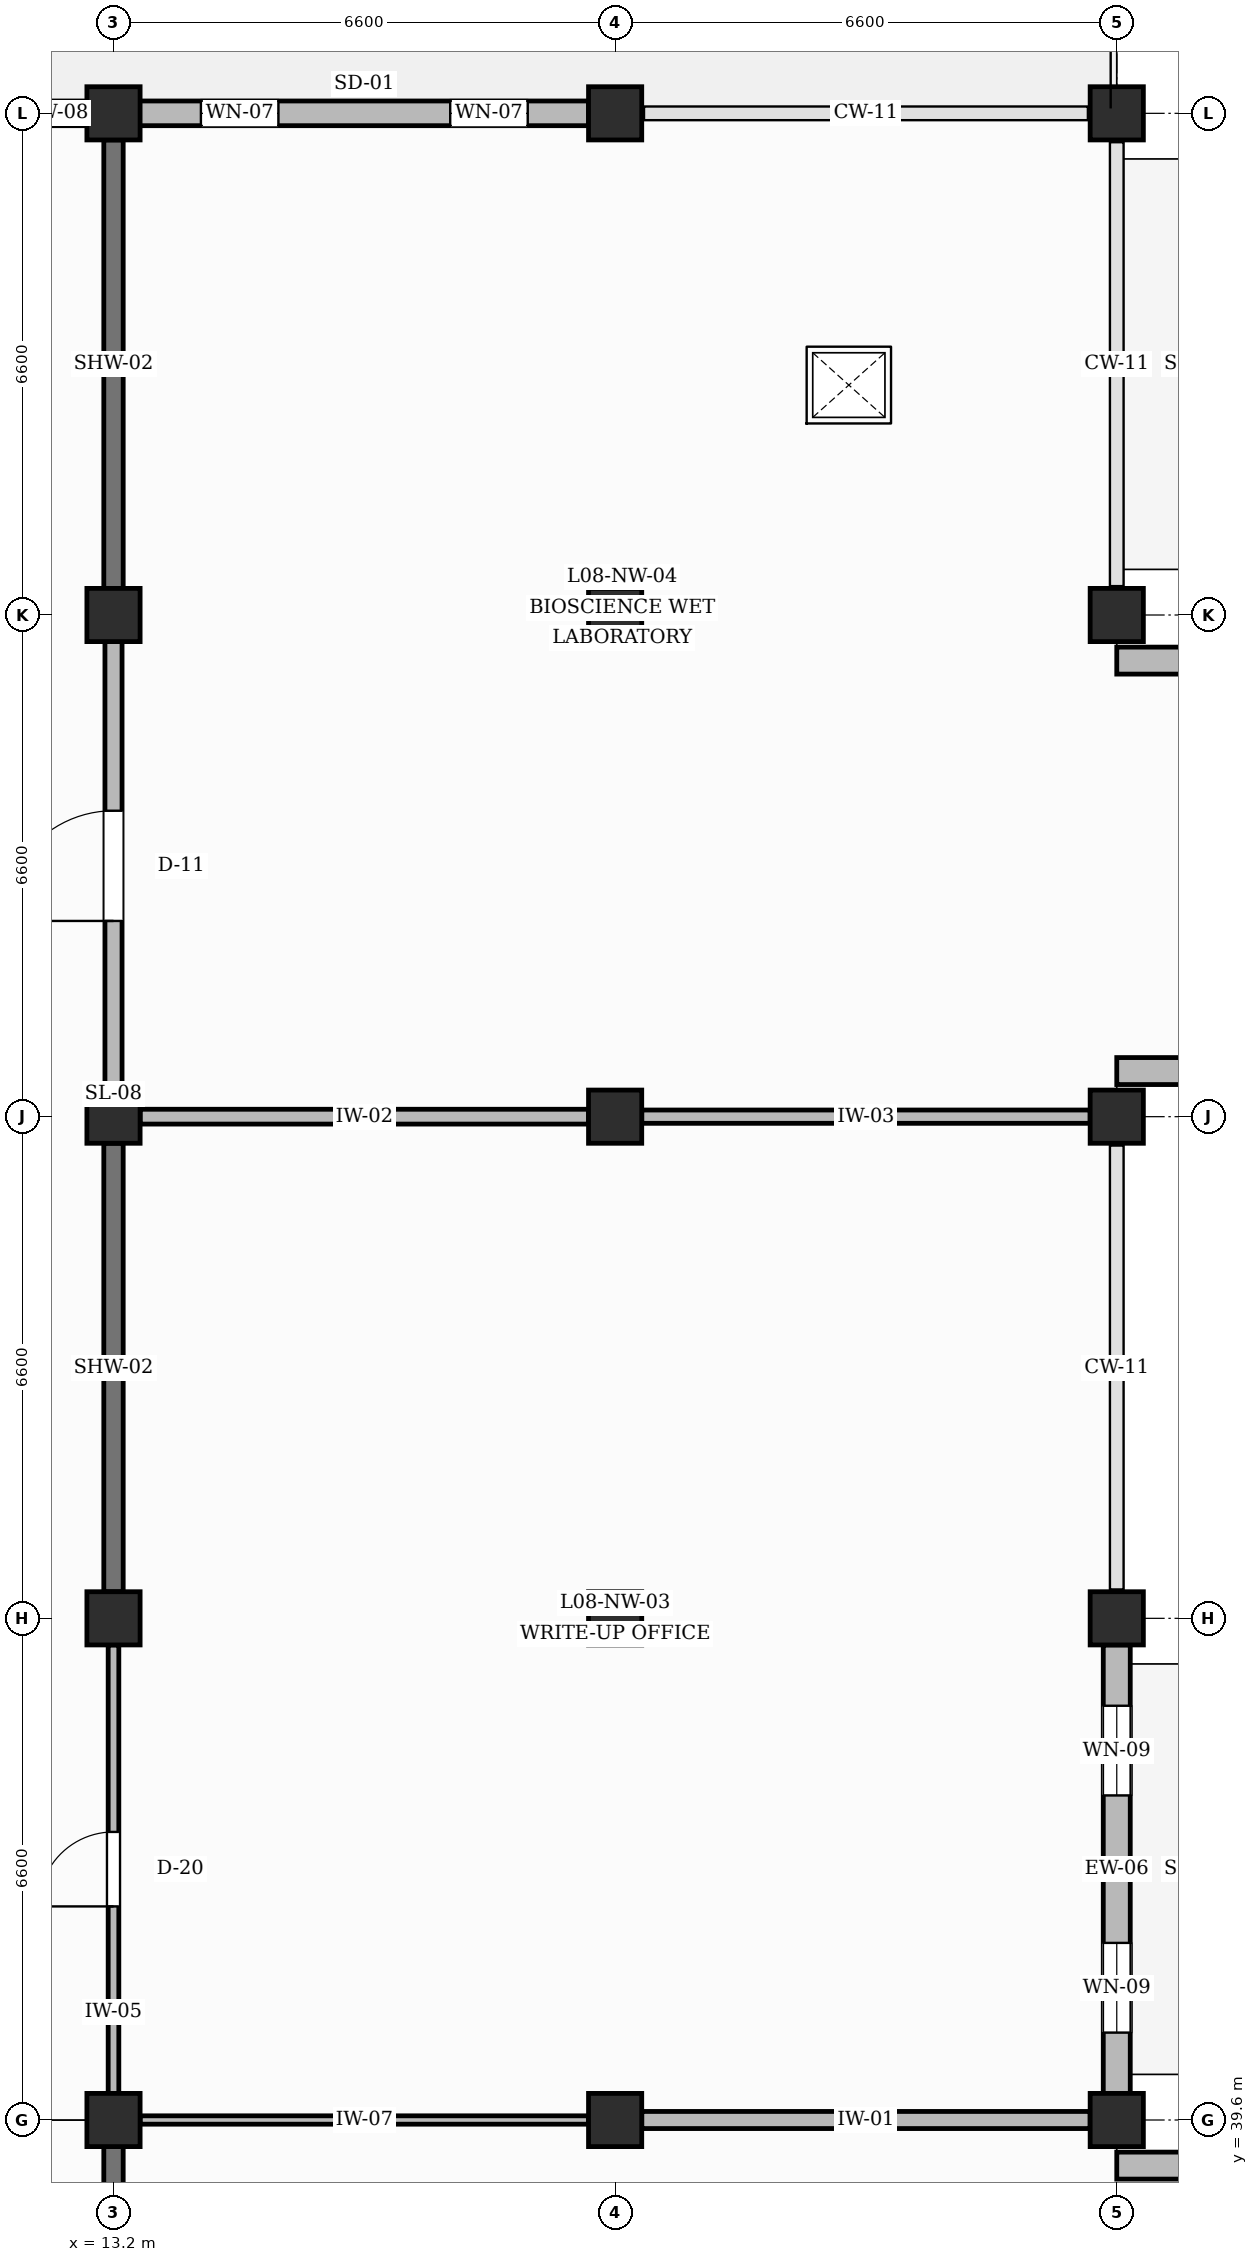
"""IFC4 building model, lengths in metres.
Left out: names, types, materials, properties, quantities, classifications, styles, units other than length and angle.
Written with IfcOpenShell. Run it as: python <this file> out.ifc"""

import sys

from ifc_helpers import new_model, si_unit, direction, frame, frame_2d, origin, origin_2d, place, context, subcontext, project, spatial, rectangle, extrude, element, fill, save


model = new_model("IFC4")
c1 = context("Model", 3, precision=1e-05, world=origin(), true_north=direction((0.0, 1.0)))
c2 = subcontext(c1, "Body", "Model", "MODEL_VIEW")
j1 = project(units=[si_unit("LENGTHUNIT", "METRE"), si_unit("PLANEANGLEUNIT", "RADIAN")], contexts=[c1])
p1 = place(None, origin())
s1 = spatial("IfcSite", under=j1, at=p1, CompositionType="ELEMENT")
p2 = place(p1, origin())
s2 = spatial("IfcBuilding", under=s1, at=p2, CompositionType="ELEMENT")
p3 = place(p2, frame((0.0, 0.0, 35.4)))
s3 = spatial("IfcBuildingStorey", under=s2, at=p3, CompositionType="ELEMENT", Elevation=35.4)
for number, where, z_axis, x_axis in (
    (1, (13.2, 39.6, 0.0), (0.0, 0.0, 1.0), (1.0, 0.0, 0.0)),
    (2, (13.2, 46.2, 0.0), (0.0, 0.0, 1.0), (1.0, 0.0, 0.0)),
    (3, (13.2, 52.8, 0.0), (0.0, 0.0, 1.0), (1.0, 0.0, 0.0)),
    (4, (13.2, 59.4, 0.0), (0.0, 0.0, 1.0), (1.0, 0.0, 0.0)),
    (5, (13.2, 66.0, 0.0), (0.0, 0.0, 1.0), (1.0, 0.0, 0.0)),
    (6, (19.8, 39.6, 0.0), (0.0, 0.0, 1.0), (1.0, 0.0, 0.0)),
    (7, (19.8, 46.2, 0.0), (0.0, 0.0, 1.0), (1.0, 0.0, 0.0)),
    (8, (19.8, 52.8, 0.0), (0.0, 0.0, 1.0), (1.0, 0.0, 0.0)),
    (9, (19.8, 59.4, 0.0), (0.0, 0.0, 1.0), (1.0, 0.0, 0.0)),
    (10, (19.8, 66.0, 0.0), (0.0, 0.0, 1.0), (1.0, 0.0, 0.0)),
    (11, (26.4, 39.6, 0.0), (0.0, 0.0, 1.0), (1.0, 0.0, 0.0)),
    (12, (26.4, 46.2, 0.0), (0.0, 0.0, 1.0), (1.0, 0.0, 0.0)),
    (13, (26.4, 52.8, 0.0), (0.0, 0.0, 1.0), (1.0, 0.0, 0.0)),
    (14, (26.4, 59.4, 0.0), (0.0, 0.0, 1.0), (1.0, 0.0, 0.0)),
    (15, (26.4, 66.0, 0.0), (0.0, 0.0, 1.0), (1.0, 0.0, 0.0)),
):
    element("IfcColumn", number, at=place(p3, frame(where, z_axis=z_axis, x_axis=x_axis)), inside=s3, PredefinedType="COLUMN", context=c2, shape_type="SweptSolid", body=[
        extrude(rectangle(XDim=0.7, YDim=0.7, at=origin_2d()), origin(), (0.0, 0.0, 1.0), 4.2),
    ])
p4 = place(p3, frame((6.95, 66.0, 0.0), z_axis=(0.0, 0.0, 1.0), x_axis=(1.0, 0.0, 0.0)))
e16 = element("IfcWall", 16, at=p4, inside=s3, PredefinedType="SOLIDWALL", context=c2, shape_type="SweptSolid", body=[
    extrude(rectangle(XDim=5.9, YDim=0.325, at=frame_2d((2.95, 0.0))), origin(), (0.0, 0.0, 1.0), 3.28),
])
p5 = place(p4, frame((2.3, 0.0, 0.0)))
e17 = element("IfcOpeningElement", 17, at=p5, cuts=e16, PredefinedType="OPENING", context=c2, shape_type="SweptSolid", body=[
    extrude(rectangle(XDim=1.3, YDim=2.2, at=frame_2d((0.65, 1.1))), frame((0.0, 0.172, 0.0), z_axis=(0.0, -1.0, 0.0), x_axis=(1.0, 0.0, 0.0)), (0.0, 0.0, 1.0), 0.345),
])
p6 = place(p3, frame((13.55, 66.0, 0.0), z_axis=(0.0, 0.0, 1.0), x_axis=(1.0, 0.0, 0.0)))
e18 = element("IfcWall", 18, at=p6, inside=s3, PredefinedType="SOLIDWALL", context=c2, shape_type="SweptSolid", body=[
    extrude(rectangle(XDim=5.9, YDim=0.325, at=frame_2d((2.95, 0.0))), origin(), (0.0, 0.0, 1.0), 3.28),
])
p7 = place(p6, frame((0.8, 0.0, 0.95)))
e19 = element("IfcOpeningElement", 19, at=p7, cuts=e18, PredefinedType="OPENING", context=c2, shape_type="SweptSolid", body=[
    extrude(rectangle(XDim=1.02, YDim=1.74, at=frame_2d((0.51, 0.87))), frame((0.0, 0.172, 0.0), z_axis=(0.0, -1.0, 0.0), x_axis=(1.0, 0.0, 0.0)), (0.0, 0.0, 1.0), 0.345),
])
p8 = place(p6, frame((4.08, 0.0, 0.95)))
e20 = element("IfcOpeningElement", 20, at=p8, cuts=e18, PredefinedType="OPENING", context=c2, shape_type="SweptSolid", body=[
    extrude(rectangle(XDim=1.02, YDim=1.74, at=frame_2d((0.51, 0.87))), frame((0.0, 0.172, 0.0), z_axis=(0.0, -1.0, 0.0), x_axis=(1.0, 0.0, 0.0)), (0.0, 0.0, 1.0), 0.345),
])
p9 = place(p3, frame((26.4, 39.0, 0.0), z_axis=(0.0, 0.0, 1.0), x_axis=(1.0, 0.0, 0.0)))
e21 = element("IfcWall", 21, at=p9, inside=s3, PredefinedType="SOLIDWALL", context=c2, shape_type="SweptSolid", body=[
    extrude(rectangle(XDim=2.0, YDim=0.355, at=frame_2d((1.0, 0.0))), origin(), (0.0, 0.0, 1.0), 3.28),
])
p10 = place(p3, frame((26.4, 39.95, 0.0), z_axis=(0.0, 0.0, 1.0), x_axis=(0.0, 1.0, 0.0)))
e22 = element("IfcWall", 22, at=p10, inside=s3, PredefinedType="SOLIDWALL", context=c2, shape_type="SweptSolid", body=[
    extrude(rectangle(XDim=5.9, YDim=0.355, at=frame_2d((2.95, 0.0))), origin(), (0.0, 0.0, 1.0), 3.28),
])
p11 = place(p10, frame((0.8, 0.0, 0.95)))
e23 = element("IfcOpeningElement", 23, at=p11, cuts=e22, PredefinedType="OPENING", context=c2, shape_type="SweptSolid", body=[
    extrude(rectangle(XDim=1.18, YDim=1.3, at=frame_2d((0.59, 0.65))), frame((0.0, 0.188, 0.0), z_axis=(0.0, -1.0, 0.0), x_axis=(1.0, 0.0, 0.0)), (0.0, 0.0, 1.0), 0.375),
])
p12 = place(p10, frame((3.92, 0.0, 0.95)))
e24 = element("IfcOpeningElement", 24, at=p12, cuts=e22, PredefinedType="OPENING", context=c2, shape_type="SweptSolid", body=[
    extrude(rectangle(XDim=1.18, YDim=1.3, at=frame_2d((0.59, 0.65))), frame((0.0, 0.188, 0.0), z_axis=(0.0, -1.0, 0.0), x_axis=(1.0, 0.0, 0.0)), (0.0, 0.0, 1.0), 0.375),
])
for number, where, z_axis, x_axis in (
    (25, (26.4, 53.4, 0.0), (0.0, 0.0, 1.0), (1.0, 0.0, 0.0)),
    (26, (26.4, 58.8, 0.0), (0.0, 0.0, 1.0), (1.0, 0.0, 0.0)),
):
    element("IfcWall", number, at=place(p3, frame(where, z_axis=z_axis, x_axis=x_axis)), inside=s3, PredefinedType="SOLIDWALL", context=c2, shape_type="SweptSolid", body=[
        extrude(rectangle(XDim=2.0, YDim=0.355, at=frame_2d((1.0, 0.0))), origin(), (0.0, 0.0, 1.0), 3.28),
    ])
p13 = place(p3, frame((13.2, 33.35, 0.0), z_axis=(0.0, 0.0, 1.0), x_axis=(0.0, 1.0, 0.0)))
e27 = element("IfcWall", 27, at=p13, inside=s3, PredefinedType="SHEAR", context=c2, shape_type="SweptSolid", body=[
    extrude(rectangle(XDim=5.9, YDim=0.255, at=frame_2d((2.95, 0.0))), origin(), (0.0, 0.0, 1.0), 3.18),
])
p14 = place(p3, frame((13.2, 39.95, 0.0), z_axis=(0.0, 0.0, 1.0), x_axis=(0.0, 1.0, 0.0)))
e28 = element("IfcWall", 28, at=p14, inside=s3, PredefinedType="PARTITIONING", context=c2, shape_type="SweptSolid", body=[
    extrude(rectangle(XDim=5.9, YDim=0.14, at=frame_2d((2.95, 0.0))), origin(), (0.0, 0.0, 1.0), 3.18),
])
p15 = place(p14, frame((2.46, 0.0, 0.0)))
e29 = element("IfcOpeningElement", 29, at=p15, cuts=e28, PredefinedType="OPENING", context=c2, shape_type="SweptSolid", body=[
    extrude(rectangle(XDim=0.98, YDim=2.15, at=frame_2d((0.49, 1.075))), frame((0.0, 0.08, 0.0), z_axis=(0.0, -1.0, 0.0), x_axis=(1.0, 0.0, 0.0)), (0.0, 0.0, 1.0), 0.16),
])
p16 = place(p3, frame((13.2, 46.55, 0.0), z_axis=(0.0, 0.0, 1.0), x_axis=(0.0, 1.0, 0.0)))
e30 = element("IfcWall", 30, at=p16, inside=s3, PredefinedType="SHEAR", context=c2, shape_type="SweptSolid", body=[
    extrude(rectangle(XDim=5.9, YDim=0.255, at=frame_2d((2.95, 0.0))), origin(), (0.0, 0.0, 1.0), 3.18),
])
p17 = place(p3, frame((13.2, 53.15, 0.0), z_axis=(0.0, 0.0, 1.0), x_axis=(0.0, 1.0, 0.0)))
e31 = element("IfcWall", 31, at=p17, inside=s3, PredefinedType="PARTITIONING", context=c2, shape_type="SweptSolid", body=[
    extrude(rectangle(XDim=5.9, YDim=0.225, at=frame_2d((2.95, 0.0))), origin(), (0.0, 0.0, 1.0), 3.18),
])
p18 = place(p17, frame((2.225, 0.0, 0.0)))
e32 = element("IfcOpeningElement", 32, at=p18, cuts=e31, PredefinedType="OPENING", context=c2, shape_type="SweptSolid", body=[
    extrude(rectangle(XDim=1.45, YDim=2.25, at=frame_2d((0.725, 1.125))), frame((0.0, 0.123, 0.0), z_axis=(0.0, -1.0, 0.0), x_axis=(1.0, 0.0, 0.0)), (0.0, 0.0, 1.0), 0.245),
])
p19 = place(p3, frame((13.2, 59.75, 0.0), z_axis=(0.0, 0.0, 1.0), x_axis=(0.0, 1.0, 0.0)))
e33 = element("IfcWall", 33, at=p19, inside=s3, PredefinedType="SHEAR", context=c2, shape_type="SweptSolid", body=[
    extrude(rectangle(XDim=5.9, YDim=0.255, at=frame_2d((2.95, 0.0))), origin(), (0.0, 0.0, 1.0), 3.18),
])
p20 = place(p3, frame((13.55, 39.6, 0.0), z_axis=(0.0, 0.0, 1.0), x_axis=(1.0, 0.0, 0.0)))
e34 = element("IfcWall", 34, at=p20, inside=s3, PredefinedType="PARTITIONING", context=c2, shape_type="SweptSolid", body=[
    extrude(rectangle(XDim=5.9, YDim=0.11, at=frame_2d((2.95, 0.0))), origin(), (0.0, 0.0, 1.0), 3.18),
])
p21 = place(p3, frame((13.55, 52.8, 0.0), z_axis=(0.0, 0.0, 1.0), x_axis=(1.0, 0.0, 0.0)))
e35 = element("IfcWall", 35, at=p21, inside=s3, PredefinedType="PARTITIONING", context=c2, shape_type="SweptSolid", body=[
    extrude(rectangle(XDim=5.9, YDim=0.195, at=frame_2d((2.95, 0.0))), origin(), (0.0, 0.0, 1.0), 3.18),
])
p22 = place(p3, frame((20.15, 39.6, 0.0), z_axis=(0.0, 0.0, 1.0), x_axis=(1.0, 0.0, 0.0)))
e36 = element("IfcWall", 36, at=p22, inside=s3, PredefinedType="PARTITIONING", context=c2, shape_type="SweptSolid", body=[
    extrude(rectangle(XDim=5.9, YDim=0.225, at=frame_2d((2.95, 0.0))), origin(), (0.0, 0.0, 1.0), 3.43),
])
p23 = place(p3, frame((20.15, 52.8, 0.0), z_axis=(0.0, 0.0, 1.0), x_axis=(1.0, 0.0, 0.0)))
e37 = element("IfcWall", 37, at=p23, inside=s3, PredefinedType="PARTITIONING", context=c2, shape_type="SweptSolid", body=[
    extrude(rectangle(XDim=5.9, YDim=0.175, at=frame_2d((2.95, 0.0))), origin(), (0.0, 0.0, 1.0), 3.43),
])
p24 = place(p7, origin())
e38 = element("IfcWindow", 38, at=p24, inside=s3, PartitioningType="SINGLE_PANEL", PredefinedType="WINDOW", context=c2, shape_type="SweptSolid", body=[
    extrude(rectangle(XDim=1.02, YDim=1.74, at=frame_2d((0.51, 0.87))), frame((0.0, 0.03, 0.0), z_axis=(0.0, -1.0, 0.0), x_axis=(1.0, 0.0, 0.0)), (0.0, 0.0, 1.0), 0.06),
])
fill(e19, e38)
p25 = place(p8, origin())
e39 = element("IfcWindow", 39, at=p25, inside=s3, PartitioningType="SINGLE_PANEL", PredefinedType="WINDOW", context=c2, shape_type="SweptSolid", body=[
    extrude(rectangle(XDim=1.02, YDim=1.74, at=frame_2d((0.51, 0.87))), frame((0.0, 0.03, 0.0), z_axis=(0.0, -1.0, 0.0), x_axis=(1.0, 0.0, 0.0)), (0.0, 0.0, 1.0), 0.06),
])
fill(e20, e39)
p26 = place(p11, origin())
e40 = element("IfcWindow", 40, at=p26, inside=s3, PartitioningType="SINGLE_PANEL", PredefinedType="WINDOW", context=c2, shape_type="SweptSolid", body=[
    extrude(rectangle(XDim=1.18, YDim=1.3, at=frame_2d((0.59, 0.65))), frame((0.0, 0.03, 0.0), z_axis=(0.0, -1.0, 0.0), x_axis=(1.0, 0.0, 0.0)), (0.0, 0.0, 1.0), 0.06),
])
fill(e23, e40)
p27 = place(p12, origin())
e41 = element("IfcWindow", 41, at=p27, inside=s3, PartitioningType="SINGLE_PANEL", PredefinedType="WINDOW", context=c2, shape_type="SweptSolid", body=[
    extrude(rectangle(XDim=1.18, YDim=1.3, at=frame_2d((0.59, 0.65))), frame((0.0, 0.03, 0.0), z_axis=(0.0, -1.0, 0.0), x_axis=(1.0, 0.0, 0.0)), (0.0, 0.0, 1.0), 0.06),
])
fill(e24, e41)
p28 = place(p15, origin())
e42 = element("IfcDoor", 42, at=p28, inside=s3, OperationType="SINGLE_SWING_LEFT", PredefinedType="DOOR", context=c2, shape_type="SweptSolid", body=[
    extrude(rectangle(XDim=0.98, YDim=2.15, at=frame_2d((0.49, 1.075))), frame((0.0, 0.025, 0.0), z_axis=(0.0, -1.0, 0.0), x_axis=(1.0, 0.0, 0.0)), (0.0, 0.0, 1.0), 0.05),
])
fill(e29, e42)
p29 = place(p18, origin())
e43 = element("IfcDoor", 43, at=p29, inside=s3, OperationType="SINGLE_SWING_LEFT", PredefinedType="DOOR", context=c2, shape_type="SweptSolid", body=[
    extrude(rectangle(XDim=1.45, YDim=2.25, at=frame_2d((0.725, 1.125))), frame((0.0, 0.025, 0.0), z_axis=(0.0, -1.0, 0.0), x_axis=(1.0, 0.0, 0.0)), (0.0, 0.0, 1.0), 0.05),
])
fill(e32, e43)
save(model, sys.argv[1])
